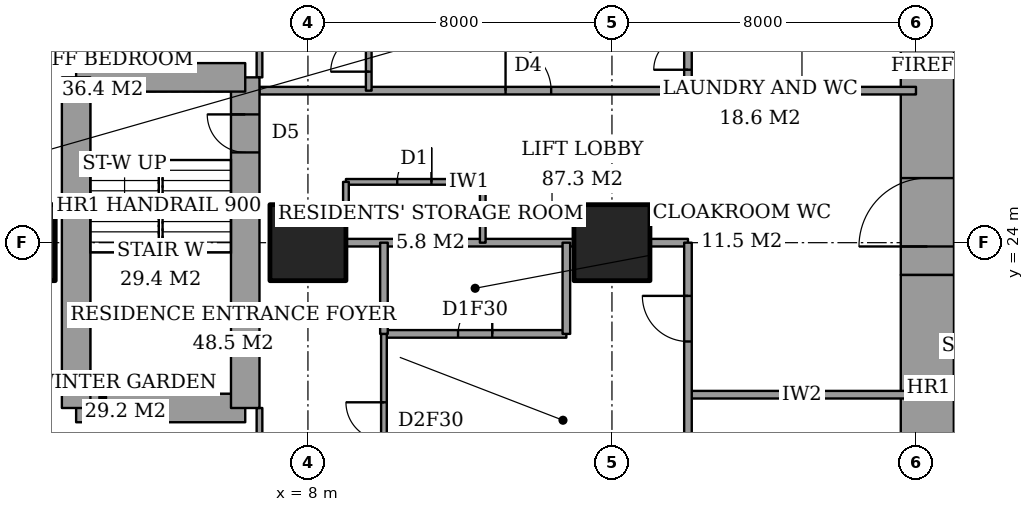
"""IFC4 building model, lengths in metres.
Left out: names, types, materials, properties, quantities, classifications, styles, units other than length and angle.
Written with IfcOpenShell. Run it as: python <this file> out.ifc"""

import sys

from ifc_helpers import new_model, si_unit, direction, frame, frame_2d, origin, origin_2d, place, context, subcontext, project, spatial, rectangle, extrude, element, fill, save


model = new_model("IFC4")
c1 = context("Model", 3, precision=1e-05, world=origin(), true_north=direction((0.0, 1.0)))
c2 = subcontext(c1, "Body", "Model", "MODEL_VIEW")
j1 = project(units=[si_unit("LENGTHUNIT", "METRE"), si_unit("PLANEANGLEUNIT", "RADIAN")], contexts=[c1])
p1 = place(None, origin())
s1 = spatial("IfcSite", under=j1, at=p1, CompositionType="ELEMENT")
p2 = place(p1, origin())
s2 = spatial("IfcBuilding", under=s1, at=p2, CompositionType="ELEMENT")
p3 = place(p2, frame((0.0, 0.0, 36.8)))
s3 = spatial("IfcBuildingStorey", under=s2, at=p3, CompositionType="ELEMENT", Elevation=36.8)
for number, where, z_axis, x_axis in (
    (1, (0.35, 24.0, 0.0), (0.0, 0.0, 1.0), (1.0, 0.0, 0.0)),
    (2, (8.0, 24.0, 0.0), (0.0, 0.0, 1.0), (1.0, 0.0, 0.0)),
    (3, (16.0, 24.0, 0.0), (0.0, 0.0, 1.0), (1.0, 0.0, 0.0)),
):
    element("IfcColumn", number, at=place(p3, frame(where, z_axis=z_axis, x_axis=x_axis)), inside=s3, PredefinedType="COLUMN", context=c2, shape_type="SweptSolid", body=[
        extrude(rectangle(XDim=2.0, YDim=2.0, at=origin_2d()), origin(), (0.0, 0.0, 1.0), 3.6),
    ])
p4 = place(p3, frame((24.3, 13.0, 0.0), z_axis=(0.0, 0.0, 1.0), x_axis=(0.0, 1.0, 0.0)))
e4 = element("IfcWall", 4, at=p4, inside=s3, PredefinedType="SHEAR", context=c2, shape_type="SweptSolid", body=[
    extrude(rectangle(XDim=10.15, YDim=1.4, at=frame_2d((5.075, 0.0))), origin(), (0.0, 0.0, 1.0), 3.6),
])
p5 = place(p3, frame((24.3, 23.15, 0.0), z_axis=(0.0, 0.0, 1.0), x_axis=(0.0, 1.0, 0.0)))
e5 = element("IfcWall", 5, at=p5, inside=s3, PredefinedType="SHEAR", context=c2, shape_type="SweptSolid", body=[
    extrude(rectangle(XDim=11.85, YDim=1.4, at=frame_2d((5.925, 0.0))), origin(), (0.0, 0.0, 1.0), 3.6),
])
p6 = place(p5, frame((0.75, 0.0, 0.0)))
e6 = element("IfcOpeningElement", 6, at=p6, cuts=e5, PredefinedType="OPENING", context=c2, shape_type="SweptSolid", body=[
    extrude(rectangle(XDim=1.8, YDim=2.4, at=frame_2d((0.9, 1.2))), frame((0.0, 0.71, 0.0), z_axis=(0.0, -1.0, 0.0), x_axis=(1.0, 0.0, 0.0)), (0.0, 0.0, 1.0), 1.42),
])
p7 = place(p3, frame((1.9, 19.65, 0.0), z_axis=(0.0, 0.0, 1.0), x_axis=(1.0, 0.0, 0.0)))
e7 = element("IfcWall", 7, at=p7, inside=s3, PredefinedType="SHEAR", context=c2, shape_type="SweptSolid", body=[
    extrude(rectangle(XDim=4.45, YDim=0.75, at=frame_2d((2.225, 0.0))), origin(), (0.0, 0.0, 1.0), 3.6),
])
p8 = place(p3, frame((6.35, 19.65, 0.0), z_axis=(0.0, 0.0, 1.0), x_axis=(0.0, 1.0, 0.0)))
e8 = element("IfcWall", 8, at=p8, inside=s3, PredefinedType="SHEAR", context=c2, shape_type="SweptSolid", body=[
    extrude(rectangle(XDim=8.7, YDim=0.75, at=frame_2d((4.35, 0.0))), origin(), (0.0, 0.0, 1.0), 3.6),
])
p9 = place(p8, frame((6.725, 0.0, 0.0)))
e9 = element("IfcOpeningElement", 9, at=p9, cuts=e8, PredefinedType="OPENING", context=c2, shape_type="SweptSolid", body=[
    extrude(rectangle(XDim=1.0, YDim=2.1, at=frame_2d((0.5, 1.05))), frame((0.0, 0.385, 0.0), z_axis=(0.0, -1.0, 0.0), x_axis=(1.0, 0.0, 0.0)), (0.0, 0.0, 1.0), 0.77),
])
p10 = place(p3, frame((6.35, 28.35, 0.0), z_axis=(0.0, 0.0, 1.0), x_axis=(-1.0, 0.0, 0.0)))
e10 = element("IfcWall", 10, at=p10, inside=s3, PredefinedType="SHEAR", context=c2, shape_type="SweptSolid", body=[
    extrude(rectangle(XDim=4.45, YDim=0.75, at=frame_2d((2.225, 0.0))), origin(), (0.0, 0.0, 1.0), 3.6),
])
p11 = place(p3, frame((1.9, 28.35, 0.0), z_axis=(0.0, 0.0, 1.0), x_axis=(0.0, -1.0, 0.0)))
e11 = element("IfcWall", 11, at=p11, inside=s3, PredefinedType="SHEAR", context=c2, shape_type="SweptSolid", body=[
    extrude(rectangle(XDim=8.7, YDim=0.75, at=frame_2d((4.35, 0.0))), origin(), (0.0, 0.0, 1.0), 3.6),
])
p12 = place(p3, frame((18.0, 20.0, 0.0), z_axis=(0.0, 0.0, 1.0), x_axis=(1.0, 0.0, 0.0)))
e12 = element("IfcWall", 12, at=p12, inside=s3, PredefinedType="PARTITIONING", context=c2, shape_type="SweptSolid", body=[
    extrude(rectangle(XDim=6.0, YDim=0.2, at=frame_2d((3.0, 0.0))), origin(), (0.0, 0.0, 1.0), 3.35),
])
p13 = place(p3, frame((10.0, 21.6, 0.0), z_axis=(0.0, 0.0, 1.0), x_axis=(1.0, 0.0, 0.0)))
e13 = element("IfcWall", 13, at=p13, inside=s3, PredefinedType="PARTITIONING", context=c2, shape_type="SweptSolid", body=[
    extrude(rectangle(XDim=4.8, YDim=0.2, at=frame_2d((2.4, 0.0))), origin(), (0.0, 0.0, 1.0), 3.35),
])
p14 = place(p13, frame((1.95, 0.0, 0.0)))
e14 = element("IfcOpeningElement", 14, at=p14, cuts=e13, PredefinedType="OPENING", context=c2, shape_type="SweptSolid", body=[
    extrude(rectangle(XDim=0.9, YDim=2.1, at=frame_2d((0.45, 1.05))), frame((0.0, 0.11, 0.0), z_axis=(0.0, -1.0, 0.0), x_axis=(1.0, 0.0, 0.0)), (0.0, 0.0, 1.0), 0.22),
])
p15 = place(p3, frame((9.0, 24.0, 0.0), z_axis=(0.0, 0.0, 1.0), x_axis=(1.0, 0.0, 0.0)))
e15 = element("IfcWall", 15, at=p15, inside=s3, PredefinedType="PARTITIONING", context=c2, shape_type="SweptSolid", body=[
    extrude(rectangle(XDim=6.0, YDim=0.2, at=frame_2d((3.0, 0.0))), origin(), (0.0, 0.0, 1.0), 3.35),
])
p16 = place(p3, frame((17.0, 24.0, 0.0), z_axis=(0.0, 0.0, 1.0), x_axis=(1.0, 0.0, 0.0)))
e16 = element("IfcWall", 16, at=p16, inside=s3, PredefinedType="PARTITIONING", context=c2, shape_type="SweptSolid", body=[
    extrude(rectangle(XDim=1.0, YDim=0.2, at=frame_2d((0.5, 0.0))), origin(), (0.0, 0.0, 1.0), 3.35),
])
p17 = place(p3, frame((9.0, 25.6, 0.0), z_axis=(0.0, 0.0, 1.0), x_axis=(1.0, 0.0, 0.0)))
e17 = element("IfcWall", 17, at=p17, inside=s3, PredefinedType="PARTITIONING", context=c2, shape_type="SweptSolid", body=[
    extrude(rectangle(XDim=3.6, YDim=0.15, at=frame_2d((1.8, 0.0))), origin(), (0.0, 0.0, 1.0), 3.35),
])
p18 = place(p17, frame((1.35, 0.0, 0.0)))
e18 = element("IfcOpeningElement", 18, at=p18, cuts=e17, PredefinedType="OPENING", context=c2, shape_type="SweptSolid", body=[
    extrude(rectangle(XDim=0.9, YDim=2.1, at=frame_2d((0.45, 1.05))), frame((0.0, 0.085, 0.0), z_axis=(0.0, -1.0, 0.0), x_axis=(1.0, 0.0, 0.0)), (0.0, 0.0, 1.0), 0.17),
])
p19 = place(p3, frame((6.725, 28.0, 0.0), z_axis=(0.0, 0.0, 1.0), x_axis=(1.0, 0.0, 0.0)))
e19 = element("IfcWall", 19, at=p19, inside=s3, PredefinedType="PARTITIONING", context=c2, shape_type="SweptSolid", body=[
    extrude(rectangle(XDim=17.275, YDim=0.2, at=frame_2d((8.637, 0.0))), origin(), (0.0, 0.0, 1.0), 3.35),
])
p20 = place(p19, frame((6.475, 0.0, 0.0)))
e20 = element("IfcOpeningElement", 20, at=p20, cuts=e19, PredefinedType="OPENING", context=c2, shape_type="SweptSolid", body=[
    extrude(rectangle(XDim=1.2, YDim=2.4, at=frame_2d((0.6, 1.2))), frame((0.0, 0.11, 0.0), z_axis=(0.0, -1.0, 0.0), x_axis=(1.0, 0.0, 0.0)), (0.0, 0.0, 1.0), 0.22),
])
p21 = place(p3, frame((6.725, 17.2, 0.0), z_axis=(0.0, 0.0, 1.0), x_axis=(0.0, 1.0, 0.0)))
e21 = element("IfcWall", 21, at=p21, inside=s3, PredefinedType="PARTITIONING", context=c2, shape_type="SweptSolid", body=[
    extrude(rectangle(XDim=2.45, YDim=0.15, at=frame_2d((1.225, 0.0))), origin(), (0.0, 0.0, 1.0), 3.35),
])
p22 = place(p21, frame((0.538, 0.0, 0.0)))
e22 = element("IfcOpeningElement", 22, at=p22, cuts=e21, PredefinedType="OPENING", context=c2, shape_type="SweptSolid", body=[
    extrude(rectangle(XDim=1.0, YDim=2.1, at=frame_2d((0.5, 1.05))), frame((0.0, 0.085, 0.0), z_axis=(0.0, -1.0, 0.0), x_axis=(1.0, 0.0, 0.0)), (0.0, 0.0, 1.0), 0.17),
])
p23 = place(p3, frame((6.725, 28.35, 0.0), z_axis=(0.0, 0.0, 1.0), x_axis=(0.0, 1.0, 0.0)))
e23 = element("IfcWall", 23, at=p23, inside=s3, PredefinedType="PARTITIONING", context=c2, shape_type="SweptSolid", body=[
    extrude(rectangle(XDim=2.45, YDim=0.15, at=frame_2d((1.225, 0.0))), origin(), (0.0, 0.0, 1.0), 3.35),
])
p24 = place(p23, frame((0.913, 0.0, 0.0)))
e24 = element("IfcOpeningElement", 24, at=p24, cuts=e23, PredefinedType="OPENING", context=c2, shape_type="SweptSolid", body=[
    extrude(rectangle(XDim=1.0, YDim=2.1, at=frame_2d((0.5, 1.05))), frame((0.0, 0.085, 0.0), z_axis=(0.0, -1.0, 0.0), x_axis=(1.0, 0.0, 0.0)), (0.0, 0.0, 1.0), 0.17),
])
p25 = place(p3, frame((9.0, 25.0, 0.0), z_axis=(0.0, 0.0, 1.0), x_axis=(0.0, 1.0, 0.0)))
e25 = element("IfcWall", 25, at=p25, inside=s3, PredefinedType="PARTITIONING", context=c2, shape_type="SweptSolid", body=[
    extrude(rectangle(XDim=0.6, YDim=0.15, at=frame_2d((0.3, 0.0))), origin(), (0.0, 0.0, 1.0), 3.35),
])
p26 = place(p3, frame((9.6, 28.0, 0.0), z_axis=(0.0, 0.0, 1.0), x_axis=(0.0, 1.0, 0.0)))
e26 = element("IfcWall", 26, at=p26, inside=s3, PredefinedType="PARTITIONING", context=c2, shape_type="SweptSolid", body=[
    extrude(rectangle(XDim=9.4, YDim=0.15, at=frame_2d((4.7, 0.0))), origin(), (0.0, 0.0, 1.0), 3.35),
])
p27 = place(p26, frame((0.5, 0.0, 0.0)))
e27 = element("IfcOpeningElement", 27, at=p27, cuts=e26, PredefinedType="OPENING", context=c2, shape_type="SweptSolid", body=[
    extrude(rectangle(XDim=1.0, YDim=2.1, at=frame_2d((0.5, 1.05))), frame((0.0, 0.085, 0.0), z_axis=(0.0, -1.0, 0.0), x_axis=(1.0, 0.0, 0.0)), (0.0, 0.0, 1.0), 0.17),
])
p28 = place(p3, frame((10.0, 21.6, 0.0), z_axis=(0.0, 0.0, 1.0), x_axis=(0.0, 1.0, 0.0)))
e28 = element("IfcWall", 28, at=p28, inside=s3, PredefinedType="PARTITIONING", context=c2, shape_type="SweptSolid", body=[
    extrude(rectangle(XDim=2.4, YDim=0.2, at=frame_2d((1.2, 0.0))), origin(), (0.0, 0.0, 1.0), 3.35),
])
p29 = place(p3, frame((10.0, 10.6, 0.0), z_axis=(0.0, 0.0, 1.0), x_axis=(0.0, 1.0, 0.0)))
e29 = element("IfcWall", 29, at=p29, inside=s3, PredefinedType="PARTITIONING", context=c2, shape_type="SweptSolid", body=[
    extrude(rectangle(XDim=11.0, YDim=0.15, at=frame_2d((5.5, 0.0))), origin(), (0.0, 0.0, 1.0), 3.35),
])
p30 = place(p29, frame((8.2, 0.0, 0.0)))
e30 = element("IfcOpeningElement", 30, at=p30, cuts=e29, PredefinedType="OPENING", context=c2, shape_type="SweptSolid", body=[
    extrude(rectangle(XDim=1.0, YDim=2.1, at=frame_2d((0.5, 1.05))), frame((0.0, 0.085, 0.0), z_axis=(0.0, -1.0, 0.0), x_axis=(1.0, 0.0, 0.0)), (0.0, 0.0, 1.0), 0.17),
])
p31 = place(p3, frame((12.6, 24.0, 0.0), z_axis=(0.0, 0.0, 1.0), x_axis=(0.0, 1.0, 0.0)))
e31 = element("IfcWall", 31, at=p31, inside=s3, PredefinedType="PARTITIONING", context=c2, shape_type="SweptSolid", body=[
    extrude(rectangle(XDim=1.6, YDim=0.15, at=frame_2d((0.8, 0.0))), origin(), (0.0, 0.0, 1.0), 3.35),
])
p32 = place(p3, frame((14.8, 21.6, 0.0), z_axis=(0.0, 0.0, 1.0), x_axis=(0.0, 1.0, 0.0)))
e32 = element("IfcWall", 32, at=p32, inside=s3, PredefinedType="PARTITIONING", context=c2, shape_type="SweptSolid", body=[
    extrude(rectangle(XDim=2.4, YDim=0.2, at=frame_2d((1.2, 0.0))), origin(), (0.0, 0.0, 1.0), 3.35),
])
p33 = place(p3, frame((18.0, 17.0, 0.0), z_axis=(0.0, 0.0, 1.0), x_axis=(0.0, 1.0, 0.0)))
e33 = element("IfcWall", 33, at=p33, inside=s3, PredefinedType="PARTITIONING", context=c2, shape_type="SweptSolid", body=[
    extrude(rectangle(XDim=7.0, YDim=0.2, at=frame_2d((3.5, 0.0))), origin(), (0.0, 0.0, 1.0), 3.35),
])
p34 = place(p33, frame((4.4, 0.0, 0.0)))
e34 = element("IfcOpeningElement", 34, at=p34, cuts=e33, PredefinedType="OPENING", context=c2, shape_type="SweptSolid", body=[
    extrude(rectangle(XDim=1.2, YDim=2.4, at=frame_2d((0.6, 1.2))), frame((0.0, 0.11, 0.0), z_axis=(0.0, -1.0, 0.0), x_axis=(1.0, 0.0, 0.0)), (0.0, 0.0, 1.0), 0.22),
])
p35 = place(p33, frame((1.05, 0.0, 0.0)))
e35 = element("IfcOpeningElement", 35, at=p35, cuts=e33, PredefinedType="OPENING", context=c2, shape_type="SweptSolid", body=[
    extrude(rectangle(XDim=0.9, YDim=2.1, at=frame_2d((0.45, 1.05))), frame((0.0, 0.11, 0.0), z_axis=(0.0, -1.0, 0.0), x_axis=(1.0, 0.0, 0.0)), (0.0, 0.0, 1.0), 0.22),
])
p36 = place(p3, frame((18.0, 28.0, 0.0), z_axis=(0.0, 0.0, 1.0), x_axis=(0.0, 1.0, 0.0)))
e36 = element("IfcWall", 36, at=p36, inside=s3, PredefinedType="PARTITIONING", context=c2, shape_type="SweptSolid", body=[
    extrude(rectangle(XDim=3.1, YDim=0.2, at=frame_2d((1.55, 0.0))), origin(), (0.0, 0.0, 1.0), 3.35),
])
p37 = place(p36, frame((0.55, 0.0, 0.0)))
e37 = element("IfcOpeningElement", 37, at=p37, cuts=e36, PredefinedType="OPENING", context=c2, shape_type="SweptSolid", body=[
    extrude(rectangle(XDim=0.9, YDim=2.1, at=frame_2d((0.45, 1.05))), frame((0.0, 0.11, 0.0), z_axis=(0.0, -1.0, 0.0), x_axis=(1.0, 0.0, 0.0)), (0.0, 0.0, 1.0), 0.22),
])
p38 = place(p30, origin())
e38 = element("IfcDoor", 38, at=p38, inside=s3, OperationType="SINGLE_SWING_LEFT", PredefinedType="DOOR", context=c2, shape_type="SweptSolid", body=[
    extrude(rectangle(XDim=1.0, YDim=2.1, at=frame_2d((0.5, 1.05))), frame((0.0, 0.025, 0.0), z_axis=(0.0, -1.0, 0.0), x_axis=(1.0, 0.0, 0.0)), (0.0, 0.0, 1.0), 0.05),
])
fill(e30, e38)
p39 = place(p14, origin())
e39 = element("IfcDoor", 39, at=p39, inside=s3, OperationType="SINGLE_SWING_LEFT", PredefinedType="DOOR", context=c2, shape_type="SweptSolid", body=[
    extrude(rectangle(XDim=0.9, YDim=2.1, at=frame_2d((0.45, 1.05))), frame((0.0, 0.025, 0.0), z_axis=(0.0, -1.0, 0.0), x_axis=(1.0, 0.0, 0.0)), (0.0, 0.0, 1.0), 0.05),
])
fill(e14, e39)
p40 = place(p34, origin())
e40 = element("IfcDoor", 40, at=p40, inside=s3, OperationType="SINGLE_SWING_LEFT", PredefinedType="DOOR", context=c2, shape_type="SweptSolid", body=[
    extrude(rectangle(XDim=1.2, YDim=2.4, at=frame_2d((0.6, 1.2))), frame((0.0, 0.025, 0.0), z_axis=(0.0, -1.0, 0.0), x_axis=(1.0, 0.0, 0.0)), (0.0, 0.0, 1.0), 0.05),
])
fill(e34, e40)
p41 = place(p27, origin())
e41 = element("IfcDoor", 41, at=p41, inside=s3, OperationType="SINGLE_SWING_RIGHT", PredefinedType="DOOR", context=c2, shape_type="SweptSolid", body=[
    extrude(rectangle(XDim=1.0, YDim=2.1, at=frame_2d((0.5, 1.05))), frame((0.0, 0.025, 0.0), z_axis=(0.0, -1.0, 0.0), x_axis=(1.0, 0.0, 0.0)), (0.0, 0.0, 1.0), 0.05),
])
fill(e27, e41)
p42 = place(p20, origin())
e42 = element("IfcDoor", 42, at=p42, inside=s3, OperationType="SINGLE_SWING_RIGHT", PredefinedType="DOOR", context=c2, shape_type="SweptSolid", body=[
    extrude(rectangle(XDim=1.2, YDim=2.4, at=frame_2d((0.6, 1.2))), frame((0.0, 0.025, 0.0), z_axis=(0.0, -1.0, 0.0), x_axis=(1.0, 0.0, 0.0)), (0.0, 0.0, 1.0), 0.05),
])
fill(e20, e42)
p43 = place(p37, origin())
e43 = element("IfcDoor", 43, at=p43, inside=s3, OperationType="SINGLE_SWING_RIGHT", PredefinedType="DOOR", context=c2, shape_type="SweptSolid", body=[
    extrude(rectangle(XDim=0.9, YDim=2.1, at=frame_2d((0.45, 1.05))), frame((0.0, 0.025, 0.0), z_axis=(0.0, -1.0, 0.0), x_axis=(1.0, 0.0, 0.0)), (0.0, 0.0, 1.0), 0.05),
])
fill(e37, e43)
p44 = place(p18, origin())
e44 = element("IfcDoor", 44, at=p44, inside=s3, OperationType="SINGLE_SWING_LEFT", PredefinedType="DOOR", context=c2, shape_type="SweptSolid", body=[
    extrude(rectangle(XDim=0.9, YDim=2.1, at=frame_2d((0.45, 1.05))), frame((0.0, 0.025, 0.0), z_axis=(0.0, -1.0, 0.0), x_axis=(1.0, 0.0, 0.0)), (0.0, 0.0, 1.0), 0.05),
])
fill(e18, e44)
p45 = place(p6, origin())
e45 = element("IfcDoor", 45, at=p45, inside=s3, OperationType="DOUBLE_DOOR_DOUBLE_SWING", PredefinedType="DOOR", context=c2, shape_type="SweptSolid", body=[
    extrude(rectangle(XDim=1.8, YDim=2.4, at=frame_2d((0.9, 1.2))), frame((0.0, 0.025, 0.0), z_axis=(0.0, -1.0, 0.0), x_axis=(1.0, 0.0, 0.0)), (0.0, 0.0, 1.0), 0.05),
])
fill(e6, e45)
p46 = place(p9, origin())
e46 = element("IfcDoor", 46, at=p46, inside=s3, OperationType="SINGLE_SWING_LEFT", PredefinedType="DOOR", context=c2, shape_type="SweptSolid", body=[
    extrude(rectangle(XDim=1.0, YDim=2.1, at=frame_2d((0.5, 1.05))), frame((0.0, 0.025, 0.0), z_axis=(0.0, -1.0, 0.0), x_axis=(1.0, 0.0, 0.0)), (0.0, 0.0, 1.0), 0.05),
])
fill(e9, e46)
save(model, sys.argv[1])
